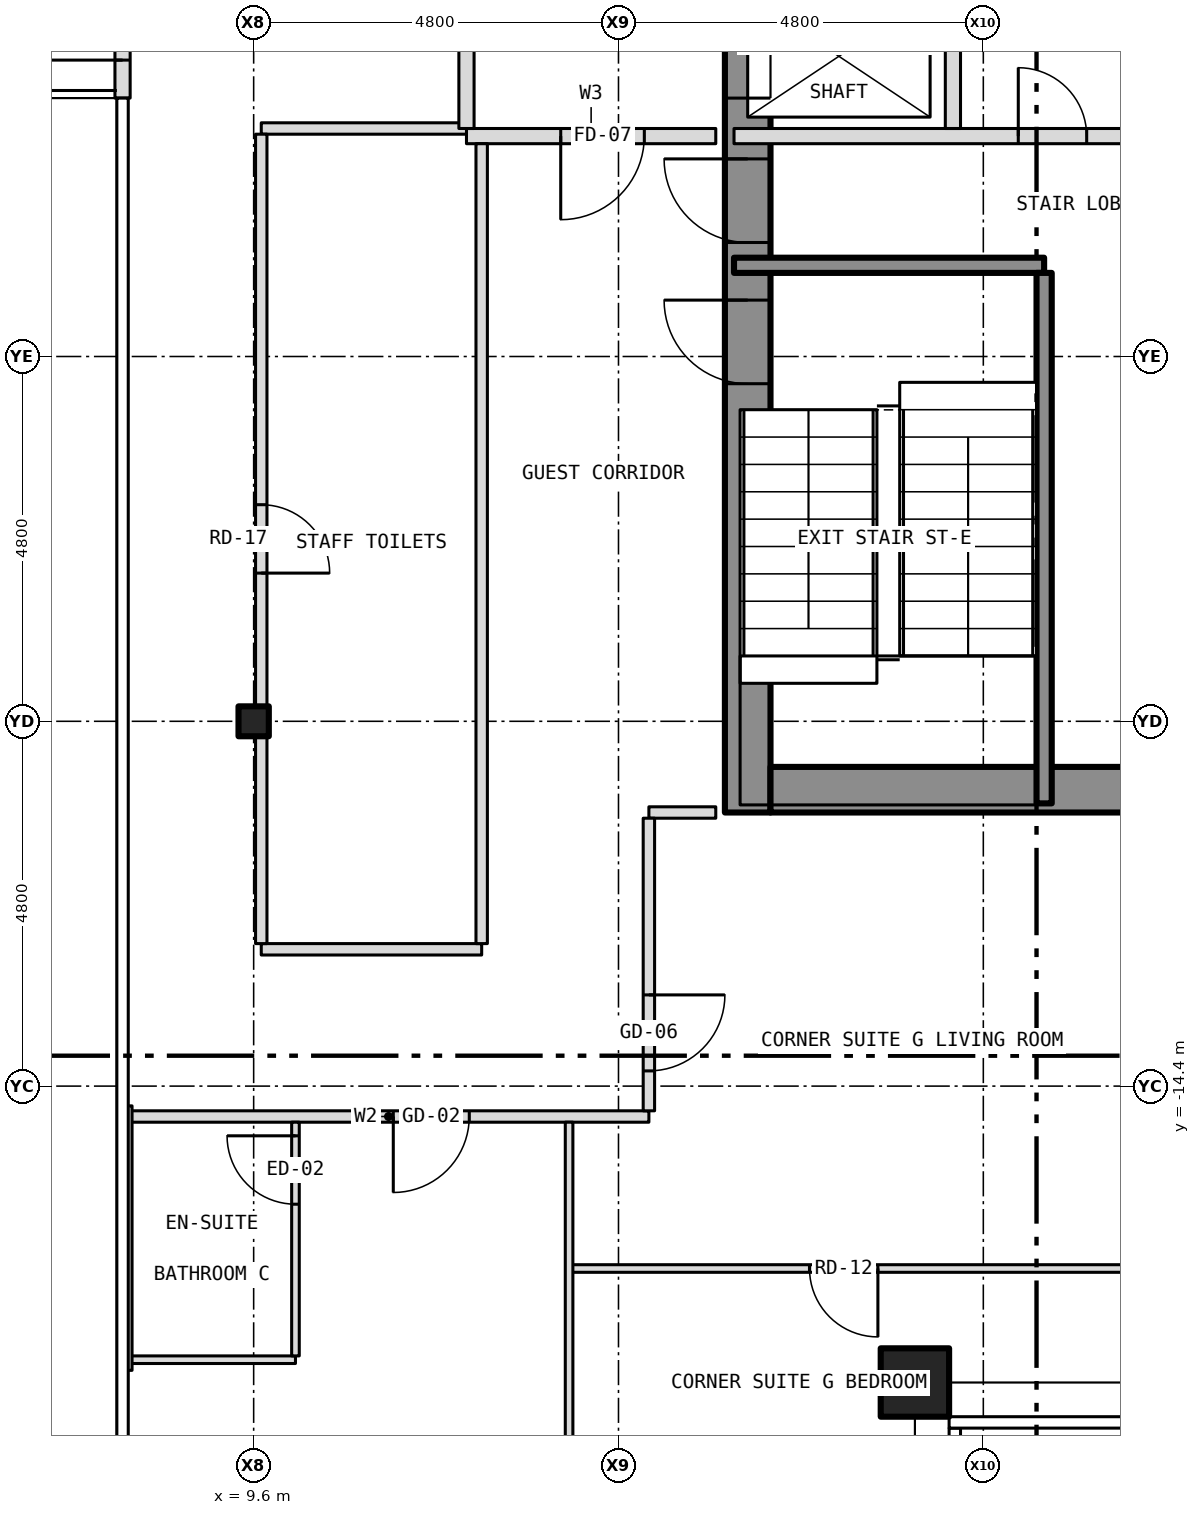
"""IFC4 building model, lengths in metres.
Left out: names, types, materials, properties, quantities, classifications, styles, units other than length and angle.
Written with IfcOpenShell. Run it as: python <this file> out.ifc"""

import sys

from ifc_helpers import new_model, si_unit, direction, frame, frame_2d, origin, origin_2d, place, context, subcontext, project, spatial, rectangle, hollow_rectangle, i_section, extrude, element, fill, save


model = new_model("IFC4")
c1 = context("Model", 3, precision=1e-05, world=origin(), true_north=direction((0.0, 1.0)))
c2 = subcontext(c1, "Body", "Model", "MODEL_VIEW")
j1 = project(units=[si_unit("LENGTHUNIT", "METRE"), si_unit("PLANEANGLEUNIT", "RADIAN")], contexts=[c1])
p1 = place(None, origin())
s1 = spatial("IfcSite", under=j1, at=p1, CompositionType="ELEMENT")
p2 = place(p1, origin())
s2 = spatial("IfcBuilding", under=s1, at=p2, CompositionType="ELEMENT")
p3 = place(p2, frame((0.0, 0.0, 134.5)))
s3 = spatial("IfcBuildingStorey", under=s2, at=p3, CompositionType="ELEMENT", Elevation=134.5)
p4 = place(p3, frame((18.3, -18.3, -0.15), z_axis=(0.0, 0.0, 1.0), x_axis=(1.0, 0.0, 0.0)))
e1 = element("IfcColumn", 1, at=p4, inside=s3, PredefinedType="COLUMN", context=c2, shape_type="SweptSolid", body=[
    extrude(hollow_rectangle(XDim=0.9, YDim=0.9, WallThickness=0.05, at=origin_2d()), origin(), (0.0, 0.0, 1.0), 3.35),
])
p5 = place(p3, frame((9.6, -9.6, -0.15), z_axis=(0.0, 0.0, 1.0), x_axis=(1.0, 0.0, 0.0)))
e2 = element("IfcColumn", 2, at=p5, inside=s3, PredefinedType="COLUMN", context=c2, shape_type="SweptSolid", body=[
    extrude(i_section(OverallWidth=0.399, OverallDepth=0.394, WebThickness=0.023, FlangeThickness=0.037, at=origin_2d()), origin(), (0.0, 0.0, 1.0), 3.35),
])
p6 = place(p3, frame((16.1, -10.8, 0.0), z_axis=(0.0, 0.0, 1.0), x_axis=(0.0, 1.0, 0.0)))
e3 = element("IfcWall", 3, at=p6, inside=s3, PredefinedType="SHEAR", context=c2, shape_type="SweptSolid", body=[
    extrude(rectangle(XDim=21.6, YDim=0.6, at=frame_2d((10.8, 0.0))), origin(), (0.0, 0.0, 1.0), 2.9),
])
p7 = place(p6, frame((9.4, 0.0, 0.0)))
e4 = element("IfcOpeningElement", 4, at=p7, cuts=e3, PredefinedType="OPENING", context=c2, shape_type="SweptSolid", body=[
    extrude(rectangle(XDim=1.1, YDim=2.1, at=frame_2d((0.55, 1.05))), frame((0.0, 0.312, 0.0), z_axis=(0.0, -1.0, 0.0), x_axis=(1.0, 0.0, 0.0)), (0.0, 0.0, 1.0), 0.624),
])
p8 = place(p6, frame((11.5, 0.0, 0.0)))
e5 = element("IfcOpeningElement", 5, at=p8, cuts=e3, PredefinedType="OPENING", context=c2, shape_type="SweptSolid", body=[
    extrude(rectangle(XDim=1.1, YDim=2.1, at=frame_2d((0.55, 1.05))), frame((0.0, 0.312, 0.0), z_axis=(0.0, -1.0, 0.0), x_axis=(1.0, 0.0, 0.0)), (0.0, 0.0, 1.0), 0.624),
])
p9 = place(p6, frame((13.6, 0.0, 0.0)))
e6 = element("IfcOpeningElement", 6, at=p9, cuts=e3, PredefinedType="OPENING", context=c2, shape_type="SweptSolid", body=[
    extrude(rectangle(XDim=1.1, YDim=2.1, at=frame_2d((0.55, 1.05))), frame((0.0, 0.312, 0.0), z_axis=(0.0, -1.0, 0.0), x_axis=(1.0, 0.0, 0.0)), (0.0, 0.0, 1.0), 0.624),
])
p10 = place(p6, frame((15.7, 0.0, 0.0)))
e7 = element("IfcOpeningElement", 7, at=p10, cuts=e3, PredefinedType="OPENING", context=c2, shape_type="SweptSolid", body=[
    extrude(rectangle(XDim=1.1, YDim=2.1, at=frame_2d((0.55, 1.05))), frame((0.0, 0.312, 0.0), z_axis=(0.0, -1.0, 0.0), x_axis=(1.0, 0.0, 0.0)), (0.0, 0.0, 1.0), 0.624),
])
p11 = place(p6, frame((17.8, 0.0, 0.0)))
e8 = element("IfcOpeningElement", 8, at=p11, cuts=e3, PredefinedType="OPENING", context=c2, shape_type="SweptSolid", body=[
    extrude(rectangle(XDim=1.1, YDim=2.1, at=frame_2d((0.55, 1.05))), frame((0.0, 0.312, 0.0), z_axis=(0.0, -1.0, 0.0), x_axis=(1.0, 0.0, 0.0)), (0.0, 0.0, 1.0), 0.624),
])
p12 = place(p6, frame((5.642, 0.0, 0.0)))
e9 = element("IfcOpeningElement", 9, at=p12, cuts=e3, PredefinedType="OPENING", context=c2, shape_type="SweptSolid", body=[
    extrude(rectangle(XDim=1.1, YDim=2.1, at=frame_2d((0.55, 1.05))), frame((0.0, 0.312, 0.0), z_axis=(0.0, -1.0, 0.0), x_axis=(1.0, 0.0, 0.0)), (0.0, 0.0, 1.0), 0.624),
])
p13 = place(p6, frame((7.5, 0.0, 0.0)))
e10 = element("IfcOpeningElement", 10, at=p13, cuts=e3, PredefinedType="OPENING", context=c2, shape_type="SweptSolid", body=[
    extrude(rectangle(XDim=1.1, YDim=2.1, at=frame_2d((0.55, 1.05))), frame((0.0, 0.312, 0.0), z_axis=(0.0, -1.0, 0.0), x_axis=(1.0, 0.0, 0.0)), (0.0, 0.0, 1.0), 0.624),
])
p14 = place(p3, frame((16.4, -10.5, 0.0), z_axis=(0.0, 0.0, 1.0), x_axis=(1.0, 0.0, 0.0)))
e11 = element("IfcWall", 11, at=p14, inside=s3, PredefinedType="SHEAR", context=c2, shape_type="SweptSolid", body=[
    extrude(rectangle(XDim=5.8, YDim=0.6, at=frame_2d((2.9, 0.0))), origin(), (0.0, 0.0, 1.0), 2.9),
])
p15 = place(p3, frame((7.875, -1.4, 0.0), z_axis=(0.0, 0.0, 1.0), x_axis=(0.0, 1.0, 0.0)))
e12 = element("IfcWall", 12, at=p15, inside=s3, PredefinedType="SOLIDWALL", context=c2, shape_type="SweptSolid", body=[
    extrude(rectangle(XDim=2.8, YDim=0.2, at=frame_2d((1.4, 0.0))), origin(), (0.0, 0.0, 1.0), 3.5),
])
p16 = place(p15, frame((0.5, 0.0, 0.0)))
e13 = element("IfcOpeningElement", 13, at=p16, cuts=e12, PredefinedType="OPENING", context=c2, shape_type="SweptSolid", body=[
    extrude(rectangle(XDim=1.8, YDim=2.1, at=frame_2d((0.9, 1.05))), frame((0.0, 0.112, 0.0), z_axis=(0.0, -1.0, 0.0), x_axis=(1.0, 0.0, 0.0)), (0.0, 0.0, 1.0), 0.224),
])
p17 = place(p3, frame((7.95, -18.0, 0.0), z_axis=(0.0, 0.0, 1.0), x_axis=(1.0, 0.0, 0.0)))
e14 = element("IfcWall", 14, at=p17, inside=s3, PredefinedType="PARTITIONING", context=c2, shape_type="SweptSolid", body=[
    extrude(rectangle(XDim=2.2, YDim=0.1, at=frame_2d((1.1, 0.0))), origin(), (0.0, 0.0, 1.0), 3.2),
])
p18 = place(p3, frame((13.75, -16.8, 0.0), z_axis=(0.0, 0.0, 1.0), x_axis=(1.0, 0.0, 0.0)))
e15 = element("IfcWall", 15, at=p18, inside=s3, PredefinedType="PARTITIONING", context=c2, shape_type="SweptSolid", body=[
    extrude(rectangle(XDim=9.53, YDim=0.1, at=frame_2d((4.765, 0.0))), origin(), (0.0, 0.0, 1.0), 3.2),
])
p19 = place(p18, frame((3.163, 0.0, 0.0)))
e16 = element("IfcOpeningElement", 16, at=p19, cuts=e15, PredefinedType="OPENING", context=c2, shape_type="SweptSolid", body=[
    extrude(rectangle(XDim=0.9, YDim=2.1, at=frame_2d((0.45, 1.05))), frame((0.0, 0.062, 0.0), z_axis=(0.0, -1.0, 0.0), x_axis=(1.0, 0.0, 0.0)), (0.0, 0.0, 1.0), 0.124),
])
p20 = place(p3, frame((7.95, -14.8, 0.0), z_axis=(0.0, 0.0, 1.0), x_axis=(1.0, 0.0, 0.0)))
e17 = element("IfcWall", 17, at=p20, inside=s3, PredefinedType="PARTITIONING", context=c2, shape_type="SweptSolid", body=[
    extrude(rectangle(XDim=6.85, YDim=0.15, at=frame_2d((3.425, 0.0))), origin(), (0.0, 0.0, 1.0), 3.2),
])
p21 = place(p20, frame((3.487, 0.0, 0.0)))
e18 = element("IfcOpeningElement", 18, at=p21, cuts=e17, PredefinedType="OPENING", context=c2, shape_type="SweptSolid", body=[
    extrude(rectangle(XDim=1.0, YDim=2.1, at=frame_2d((0.5, 1.05))), frame((0.0, 0.087, 0.0), z_axis=(0.0, -1.0, 0.0), x_axis=(1.0, 0.0, 0.0)), (0.0, 0.0, 1.0), 0.174),
])
p22 = place(p3, frame((9.7, -12.6, 0.0), z_axis=(0.0, 0.0, 1.0), x_axis=(1.0, 0.0, 0.0)))
e19 = element("IfcWall", 19, at=p22, inside=s3, PredefinedType="PARTITIONING", context=c2, shape_type="SweptSolid", body=[
    extrude(rectangle(XDim=2.9, YDim=0.15, at=frame_2d((1.45, 0.0))), origin(), (0.0, 0.0, 1.0), 3.2),
])
p23 = place(p3, frame((14.8, -10.8, 0.0), z_axis=(0.0, 0.0, 1.0), x_axis=(1.0, 0.0, 0.0)))
e20 = element("IfcWall", 20, at=p23, inside=s3, PredefinedType="PARTITIONING", context=c2, shape_type="SweptSolid", body=[
    extrude(rectangle(XDim=0.88, YDim=0.15, at=frame_2d((0.44, 0.0))), origin(), (0.0, 0.0, 1.0), 3.2),
])
p24 = place(p3, frame((15.92, -3.6, 0.0), z_axis=(0.0, 0.0, 1.0), x_axis=(1.0, 0.0, 0.0)))
e21 = element("IfcWall", 21, at=p24, inside=s3, PredefinedType="SHEAR", context=c2, shape_type="SweptSolid", body=[
    extrude(rectangle(XDim=4.08, YDim=0.2, at=frame_2d((2.04, 0.0))), origin(), (0.0, 0.0, 1.0), 2.9),
])
p25 = place(p3, frame((12.4, -1.9, 0.0), z_axis=(0.0, 0.0, 1.0), x_axis=(1.0, 0.0, 0.0)))
e22 = element("IfcWall", 22, at=p25, inside=s3, PredefinedType="PARTITIONING", context=c2, shape_type="SweptSolid", body=[
    extrude(rectangle(XDim=3.28, YDim=0.2, at=frame_2d((1.64, 0.0))), origin(), (0.0, 0.0, 1.0), 3.2),
])
p26 = place(p25, frame((1.24, 0.0, 0.0)))
e23 = element("IfcOpeningElement", 23, at=p26, cuts=e22, PredefinedType="OPENING", context=c2, shape_type="SweptSolid", body=[
    extrude(rectangle(XDim=1.1, YDim=2.1, at=frame_2d((0.55, 1.05))), frame((0.0, 0.112, 0.0), z_axis=(0.0, -1.0, 0.0), x_axis=(1.0, 0.0, 0.0)), (0.0, 0.0, 1.0), 0.224),
])
p27 = place(p3, frame((15.92, -1.9, 0.0), z_axis=(0.0, 0.0, 1.0), x_axis=(1.0, 0.0, 0.0)))
e24 = element("IfcWall", 24, at=p27, inside=s3, PredefinedType="PARTITIONING", context=c2, shape_type="SweptSolid", body=[
    extrude(rectangle(XDim=6.76, YDim=0.2, at=frame_2d((3.38, 0.0))), origin(), (0.0, 0.0, 1.0), 2.9),
])
p28 = place(p27, frame((3.74, 0.0, 0.0)))
e25 = element("IfcOpeningElement", 25, at=p28, cuts=e24, PredefinedType="OPENING", context=c2, shape_type="SweptSolid", body=[
    extrude(rectangle(XDim=0.9, YDim=2.1, at=frame_2d((0.45, 1.05))), frame((0.0, 0.112, 0.0), z_axis=(0.0, -1.0, 0.0), x_axis=(1.0, 0.0, 0.0)), (0.0, 0.0, 1.0), 0.224),
])
p29 = place(p3, frame((9.7, -1.8, 0.0), z_axis=(0.0, 0.0, 1.0), x_axis=(1.0, 0.0, 0.0)))
e26 = element("IfcWall", 26, at=p29, inside=s3, PredefinedType="PARTITIONING", context=c2, shape_type="SweptSolid", body=[
    extrude(rectangle(XDim=2.7, YDim=0.15, at=frame_2d((1.35, 0.0))), origin(), (0.0, 0.0, 1.0), 3.2),
])
p30 = place(p3, frame((7.95, -18.14, 0.0), z_axis=(0.0, 0.0, 1.0), x_axis=(0.0, 1.0, 0.0)))
e27 = element("IfcWall", 27, at=p30, inside=s3, PredefinedType="PARTITIONING", context=c2, shape_type="SweptSolid", body=[
    extrude(rectangle(XDim=3.48, YDim=0.1, at=frame_2d((1.74, 0.0))), origin(), (0.0, 0.0, 1.0), 3.2),
])
p31 = place(p3, frame((9.7, -12.525, 0.0), z_axis=(0.0, 0.0, 1.0), x_axis=(0.0, 1.0, 0.0)))
e28 = element("IfcWall", 28, at=p31, inside=s3, PredefinedType="PARTITIONING", context=c2, shape_type="SweptSolid", body=[
    extrude(rectangle(XDim=2.725, YDim=0.15, at=frame_2d((1.362, 0.0))), origin(), (0.0, 0.0, 1.0), 2.578),
])
p32 = place(p3, frame((9.7, -9.8, 0.0), z_axis=(0.0, 0.0, 1.0), x_axis=(0.0, 1.0, 0.0)))
e29 = element("IfcWall", 29, at=p32, inside=s3, PredefinedType="PARTITIONING", context=c2, shape_type="SweptSolid", body=[
    extrude(rectangle(XDim=0.401, YDim=0.15, at=frame_2d((0.201, 0.0))), origin(), (0.0, 0.0, 1.0), 3.2),
])
p33 = place(p3, frame((9.7, -9.399, 0.0), z_axis=(0.0, 0.0, 1.0), x_axis=(0.0, 1.0, 0.0)))
e30 = element("IfcWall", 30, at=p33, inside=s3, PredefinedType="PARTITIONING", context=c2, shape_type="SweptSolid", body=[
    extrude(rectangle(XDim=7.524, YDim=0.15, at=frame_2d((3.762, 0.0))), origin(), (0.0, 0.0, 1.0), 2.578),
])
p34 = place(p33, frame((1.749, 0.0, 0.0)))
e31 = element("IfcOpeningElement", 31, at=p34, cuts=e30, PredefinedType="OPENING", context=c2, shape_type="SweptSolid", body=[
    extrude(rectangle(XDim=0.9, YDim=2.1, at=frame_2d((0.45, 1.05))), frame((0.0, 0.087, 0.0), z_axis=(0.0, -1.0, 0.0), x_axis=(1.0, 0.0, 0.0)), (0.0, 0.0, 1.0), 0.174),
])
p35 = place(p3, frame((10.15, -17.95, 0.0), z_axis=(0.0, 0.0, 1.0), x_axis=(0.0, 1.0, 0.0)))
e32 = element("IfcWall", 32, at=p35, inside=s3, PredefinedType="PARTITIONING", context=c2, shape_type="SweptSolid", body=[
    extrude(rectangle(XDim=3.075, YDim=0.1, at=frame_2d((1.538, 0.0))), origin(), (0.0, 0.0, 1.0), 3.2),
])
p36 = place(p35, frame((1.996, 0.0, 0.0)))
e33 = element("IfcOpeningElement", 33, at=p36, cuts=e32, PredefinedType="OPENING", context=c2, shape_type="SweptSolid", body=[
    extrude(rectangle(XDim=0.9, YDim=2.1, at=frame_2d((0.45, 1.05))), frame((0.0, 0.062, 0.0), z_axis=(0.0, -1.0, 0.0), x_axis=(1.0, 0.0, 0.0)), (0.0, 0.0, 1.0), 0.124),
])
p37 = place(p3, frame((12.4, -1.8, 0.0), z_axis=(0.0, 0.0, 1.0), x_axis=(0.0, 1.0, 0.0)))
e34 = element("IfcWall", 34, at=p37, inside=s3, PredefinedType="PARTITIONING", context=c2, shape_type="SweptSolid", body=[
    extrude(rectangle(XDim=4.0, YDim=0.2, at=frame_2d((2.0, 0.0))), origin(), (0.0, 0.0, 1.0), 3.2),
])
p38 = place(p37, frame((1.25, 0.0, 0.0)))
e35 = element("IfcOpeningElement", 35, at=p38, cuts=e34, PredefinedType="OPENING", context=c2, shape_type="SweptSolid", body=[
    extrude(rectangle(XDim=1.1, YDim=2.1, at=frame_2d((0.55, 1.05))), frame((0.0, 0.112, 0.0), z_axis=(0.0, -1.0, 0.0), x_axis=(1.0, 0.0, 0.0)), (0.0, 0.0, 1.0), 0.224),
])
p39 = place(p3, frame((12.6, -12.525, 0.0), z_axis=(0.0, 0.0, 1.0), x_axis=(0.0, 1.0, 0.0)))
e36 = element("IfcWall", 36, at=p39, inside=s3, PredefinedType="PARTITIONING", context=c2, shape_type="SweptSolid", body=[
    extrude(rectangle(XDim=10.525, YDim=0.15, at=frame_2d((5.262, 0.0))), origin(), (0.0, 0.0, 1.0), 3.2),
])
p40 = place(p3, frame((13.75, -22.68, 0.0), z_axis=(0.0, 0.0, 1.0), x_axis=(0.0, 1.0, 0.0)))
e37 = element("IfcWall", 37, at=p40, inside=s3, PredefinedType="PARTITIONING", context=c2, shape_type="SweptSolid", body=[
    extrude(rectangle(XDim=7.805, YDim=0.1, at=frame_2d((3.902, 0.0))), origin(), (0.0, 0.0, 1.0), 3.2),
])
p41 = place(p3, frame((14.8, -14.725, 0.0), z_axis=(0.0, 0.0, 1.0), x_axis=(0.0, 1.0, 0.0)))
e38 = element("IfcWall", 38, at=p41, inside=s3, PredefinedType="PARTITIONING", context=c2, shape_type="SweptSolid", body=[
    extrude(rectangle(XDim=3.85, YDim=0.15, at=frame_2d((1.925, 0.0))), origin(), (0.0, 0.0, 1.0), 3.2),
])
p42 = place(p41, frame((0.525, 0.0, 0.0)))
e39 = element("IfcOpeningElement", 39, at=p42, cuts=e38, PredefinedType="OPENING", context=c2, shape_type="SweptSolid", body=[
    extrude(rectangle(XDim=1.0, YDim=2.1, at=frame_2d((0.5, 1.05))), frame((0.0, 0.087, 0.0), z_axis=(0.0, -1.0, 0.0), x_axis=(1.0, 0.0, 0.0)), (0.0, 0.0, 1.0), 0.174),
])
p43 = place(p3, frame((18.8, -1.8, 0.0), z_axis=(0.0, 0.0, 1.0), x_axis=(0.0, 1.0, 0.0)))
e40 = element("IfcWall", 40, at=p43, inside=s3, PredefinedType="PARTITIONING", context=c2, shape_type="SweptSolid", body=[
    extrude(rectangle(XDim=6.15, YDim=0.2, at=frame_2d((3.075, 0.0))), origin(), (0.0, 0.0, 1.0), 2.9),
])
p44 = place(p3, frame((20.0, -10.68, 0.0), z_axis=(0.0, 0.0, 1.0), x_axis=(0.0, 1.0, 0.0)))
e41 = element("IfcWall", 41, at=p44, inside=s3, PredefinedType="SHEAR", context=c2, shape_type="SweptSolid", body=[
    extrude(rectangle(XDim=6.98, YDim=0.2, at=frame_2d((3.49, 0.0))), origin(), (0.0, 0.0, 1.0), 2.9),
])
p45 = place(p16, origin())
e42 = element("IfcDoor", 42, at=p45, inside=s3, OperationType="DOUBLE_DOOR_DOUBLE_SWING", PredefinedType="DOOR", context=c2, shape_type="SweptSolid", body=[
    extrude(rectangle(XDim=1.8, YDim=2.1, at=frame_2d((0.9, 1.05))), frame((0.0, 0.025, 0.0), z_axis=(0.0, -1.0, 0.0), x_axis=(1.0, 0.0, 0.0)), (0.0, 0.0, 1.0), 0.05),
])
fill(e13, e42)
p46 = place(p7, origin())
e43 = element("IfcDoor", 43, at=p46, inside=s3, OperationType="SLIDING_TO_LEFT", PredefinedType="DOOR", context=c2, shape_type="SweptSolid", body=[
    extrude(rectangle(XDim=1.1, YDim=2.1, at=frame_2d((0.55, 1.05))), frame((0.0, 0.025, 0.0), z_axis=(0.0, -1.0, 0.0), x_axis=(1.0, 0.0, 0.0)), (0.0, 0.0, 1.0), 0.05),
])
fill(e4, e43)
p47 = place(p12, origin())
e44 = element("IfcDoor", 44, at=p47, inside=s3, OperationType="SINGLE_SWING_RIGHT", PredefinedType="DOOR", context=c2, shape_type="SweptSolid", body=[
    extrude(rectangle(XDim=1.1, YDim=2.1, at=frame_2d((0.55, 1.05))), frame((0.0, 0.025, 0.0), z_axis=(0.0, -1.0, 0.0), x_axis=(1.0, 0.0, 0.0)), (0.0, 0.0, 1.0), 0.05),
])
fill(e9, e44)
p48 = place(p13, origin())
e45 = element("IfcDoor", 45, at=p48, inside=s3, OperationType="SINGLE_SWING_RIGHT", PredefinedType="DOOR", context=c2, shape_type="SweptSolid", body=[
    extrude(rectangle(XDim=1.1, YDim=2.1, at=frame_2d((0.55, 1.05))), frame((0.0, 0.025, 0.0), z_axis=(0.0, -1.0, 0.0), x_axis=(1.0, 0.0, 0.0)), (0.0, 0.0, 1.0), 0.05),
])
fill(e10, e45)
p49 = place(p28, origin())
e46 = element("IfcDoor", 46, at=p49, inside=s3, OperationType="SINGLE_SWING_LEFT", PredefinedType="DOOR", context=c2, shape_type="SweptSolid", body=[
    extrude(rectangle(XDim=0.9, YDim=2.1, at=frame_2d((0.45, 1.05))), frame((0.0, 0.025, 0.0), z_axis=(0.0, -1.0, 0.0), x_axis=(1.0, 0.0, 0.0)), (0.0, 0.0, 1.0), 0.05),
])
fill(e25, e46)
p50 = place(p26, origin())
e47 = element("IfcDoor", 47, at=p50, inside=s3, OperationType="SINGLE_SWING_LEFT", PredefinedType="DOOR", context=c2, shape_type="SweptSolid", body=[
    extrude(rectangle(XDim=1.1, YDim=2.1, at=frame_2d((0.55, 1.05))), frame((0.0, 0.025, 0.0), z_axis=(0.0, -1.0, 0.0), x_axis=(1.0, 0.0, 0.0)), (0.0, 0.0, 1.0), 0.05),
])
fill(e23, e47)
p51 = place(p21, origin())
e48 = element("IfcDoor", 48, at=p51, inside=s3, OperationType="SINGLE_SWING_LEFT", PredefinedType="DOOR", context=c2, shape_type="SweptSolid", body=[
    extrude(rectangle(XDim=1.0, YDim=2.1, at=frame_2d((0.5, 1.05))), frame((0.0, 0.025, 0.0), z_axis=(0.0, -1.0, 0.0), x_axis=(1.0, 0.0, 0.0)), (0.0, 0.0, 1.0), 0.05),
])
fill(e18, e48)
p52 = place(p36, origin())
e49 = element("IfcDoor", 49, at=p52, inside=s3, OperationType="SINGLE_SWING_RIGHT", PredefinedType="DOOR", context=c2, shape_type="SweptSolid", body=[
    extrude(rectangle(XDim=0.9, YDim=2.1, at=frame_2d((0.45, 1.05))), frame((0.0, 0.025, 0.0), z_axis=(0.0, -1.0, 0.0), x_axis=(1.0, 0.0, 0.0)), (0.0, 0.0, 1.0), 0.05),
])
fill(e33, e49)
p53 = place(p42, origin())
e50 = element("IfcDoor", 50, at=p53, inside=s3, OperationType="SINGLE_SWING_RIGHT", PredefinedType="DOOR", context=c2, shape_type="SweptSolid", body=[
    extrude(rectangle(XDim=1.0, YDim=2.1, at=frame_2d((0.5, 1.05))), frame((0.0, 0.025, 0.0), z_axis=(0.0, -1.0, 0.0), x_axis=(1.0, 0.0, 0.0)), (0.0, 0.0, 1.0), 0.05),
])
fill(e39, e50)
p54 = place(p19, origin())
e51 = element("IfcDoor", 51, at=p54, inside=s3, OperationType="SINGLE_SWING_RIGHT", PredefinedType="DOOR", context=c2, shape_type="SweptSolid", body=[
    extrude(rectangle(XDim=0.9, YDim=2.1, at=frame_2d((0.45, 1.05))), frame((0.0, 0.025, 0.0), z_axis=(0.0, -1.0, 0.0), x_axis=(1.0, 0.0, 0.0)), (0.0, 0.0, 1.0), 0.05),
])
fill(e16, e51)
p55 = place(p34, origin())
e52 = element("IfcDoor", 52, at=p55, inside=s3, OperationType="SINGLE_SWING_LEFT", PredefinedType="DOOR", context=c2, shape_type="SweptSolid", body=[
    extrude(rectangle(XDim=0.9, YDim=2.1, at=frame_2d((0.45, 1.05))), frame((0.0, 0.025, 0.0), z_axis=(0.0, -1.0, 0.0), x_axis=(1.0, 0.0, 0.0)), (0.0, 0.0, 1.0), 0.05),
])
fill(e31, e52)
save(model, sys.argv[1])
